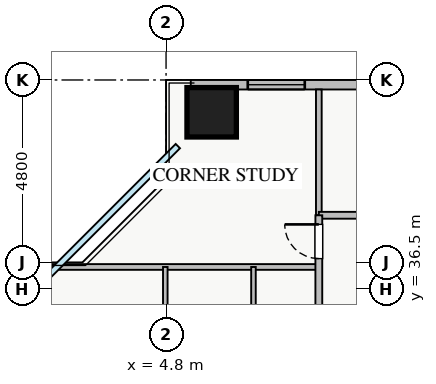
"""IFC4 building model, lengths in metres.
Left out: names, types, materials, properties, quantities, classifications, styles, units other than length and angle.
Written with IfcOpenShell. Run it as: python <this file> out.ifc"""

import sys

from ifc_helpers import new_model, si_unit, direction, frame, frame_2d, origin, origin_2d, place, context, subcontext, project, spatial, rectangle, extrude, source, transform, mapped, element, fill, save


model = new_model("IFC4")
c1 = context("Model", 3, precision=1e-05, world=origin(), true_north=direction((0.0, 1.0)))
c2 = subcontext(c1, "Body", "Model", "MODEL_VIEW")
j1 = project(units=[si_unit("LENGTHUNIT", "METRE"), si_unit("PLANEANGLEUNIT", "RADIAN")], contexts=[c1])
p1 = place(None, origin())
s1 = spatial("IfcSite", under=j1, at=p1, CompositionType="ELEMENT")
p2 = place(p1, origin())
s2 = spatial("IfcBuilding", under=s1, at=p2, CompositionType="ELEMENT")
p3 = place(p2, frame((0.0, 0.0, 56.75)))
s3 = spatial("IfcBuildingStorey", under=s2, at=p3, CompositionType="ELEMENT", Elevation=56.75)
m1 = source(origin(), c2, "Body", "SweptSolid", [
    extrude(rectangle(XDim=1.3, YDim=1.3, at=origin_2d()), origin(), (0.0, 0.0, 1.0), 3.25),
])
p4 = place(p3, frame((6.0, 41.15, 0.0), z_axis=(0.0, 0.0, 1.0), x_axis=(1.0, 0.0, 0.0)))
e1 = element("IfcColumn", 1, at=p4, inside=s3, PredefinedType="COLUMN", context=c2, shape_type="MappedRepresentation", body=[
    mapped(m1, transform((0.0, 0.0, 0.0), x_axis=(1.0, 0.0, 0.0), y_axis=(0.0, 1.0, 0.0), z_axis=(0.0, 0.0, 1.0), scale=1.0)),
])
p5 = place(p3, frame((5.45, 41.875, 0.0), z_axis=(0.0, 0.0, 1.0), x_axis=(1.0, 0.0, 0.0)))
e2 = element("IfcWall", 2, at=p5, inside=s3, PredefinedType="STANDARD", context=c2, shape_type="SweptSolid", body=[
    extrude(rectangle(XDim=27.1, YDim=0.25, at=frame_2d((13.55, 0.0))), origin(), (0.0, 0.0, 1.0), 2.61),
])
p6 = place(p5, frame((14.4, 0.0, 0.0)))
e3 = element("IfcOpeningElement", 3, at=p6, cuts=e2, PredefinedType="OPENING", context=c2, shape_type="SweptSolid", body=[
    extrude(rectangle(XDim=1.2, YDim=2.1, at=frame_2d((0.6, 1.05))), frame((0.0, 0.135, 0.0), z_axis=(0.0, -1.0, 0.0), x_axis=(1.0, 0.0, 0.0)), (0.0, 0.0, 1.0), 0.27),
])
p7 = place(p5, frame((1.5, 0.0, 0.9)))
e4 = element("IfcOpeningElement", 4, at=p7, cuts=e2, PredefinedType="OPENING", context=c2, shape_type="SweptSolid", body=[
    extrude(rectangle(XDim=1.5, YDim=1.5, at=frame_2d((0.75, 0.75))), frame((0.0, 0.135, 0.0), z_axis=(0.0, -1.0, 0.0), x_axis=(1.0, 0.0, 0.0)), (0.0, 0.0, 1.0), 0.27),
])
p8 = place(p5, frame((9.263, 0.0, 0.9)))
e5 = element("IfcOpeningElement", 5, at=p8, cuts=e2, PredefinedType="OPENING", context=c2, shape_type="SweptSolid", body=[
    extrude(rectangle(XDim=1.8, YDim=1.45, at=frame_2d((0.9, 0.725))), frame((0.0, 0.135, 0.0), z_axis=(0.0, -1.0, 0.0), x_axis=(1.0, 0.0, 0.0)), (0.0, 0.0, 1.0), 0.27),
])
p9 = place(p5, frame((18.774, 0.0, 0.9)))
e6 = element("IfcOpeningElement", 6, at=p9, cuts=e2, PredefinedType="OPENING", context=c2, shape_type="SweptSolid", body=[
    extrude(rectangle(XDim=1.5, YDim=1.5, at=frame_2d((0.75, 0.75))), frame((0.0, 0.135, 0.0), z_axis=(0.0, -1.0, 0.0), x_axis=(1.0, 0.0, 0.0)), (0.0, 0.0, 1.0), 0.27),
])
p10 = place(p5, frame((22.663, 0.0, 0.9)))
e7 = element("IfcOpeningElement", 7, at=p10, cuts=e2, PredefinedType="OPENING", context=c2, shape_type="SweptSolid", body=[
    extrude(rectangle(XDim=2.1, YDim=1.48, at=frame_2d((1.05, 0.74))), frame((0.0, 0.135, 0.0), z_axis=(0.0, -1.0, 0.0), x_axis=(1.0, 0.0, 0.0)), (0.0, 0.0, 1.0), 0.27),
])
p11 = place(p5, frame((5.134, 0.0, 0.9)))
e8 = element("IfcOpeningElement", 8, at=p11, cuts=e2, PredefinedType="OPENING", context=c2, shape_type="SweptSolid", body=[
    extrude(rectangle(XDim=2.4, YDim=1.5, at=frame_2d((1.2, 0.75))), frame((0.0, 0.135, 0.0), z_axis=(0.0, -1.0, 0.0), x_axis=(1.0, 0.0, 0.0)), (0.0, 0.0, 1.0), 0.27),
])
p12 = place(p3, frame((8.82, 38.44, 0.0), z_axis=(0.0, 0.0, 1.0), x_axis=(0.0, 1.0, 0.0)))
e9 = element("IfcWall", 9, at=p12, inside=s3, PredefinedType="PARTITIONING", context=c2, shape_type="SweptSolid", body=[
    extrude(rectangle(XDim=3.31, YDim=0.15, at=frame_2d((1.655, 0.0))), origin(), (0.0, 0.0, 1.0), 3.07),
])
p13 = place(p3, frame((8.82, 38.44, 0.0), z_axis=(0.0, 0.0, 1.0), x_axis=(1.0, 0.0, 0.0)))
e10 = element("IfcWall", 10, at=p13, inside=s3, PredefinedType="PARTITIONING", context=c2, shape_type="SweptSolid", body=[
    extrude(rectangle(XDim=23.58, YDim=0.18, at=frame_2d((11.79, 0.0))), origin(), (0.0, 0.0, 1.0), 3.07),
])
p14 = place(p13, frame((5.99, 0.0, 0.0)))
e11 = element("IfcOpeningElement", 11, at=p14, cuts=e10, PredefinedType="OPENING", context=c2, shape_type="SweptSolid", body=[
    extrude(rectangle(XDim=1.0, YDim=2.05, at=frame_2d((0.5, 1.025))), frame((0.0, 0.1, 0.0), z_axis=(0.0, -1.0, 0.0), x_axis=(1.0, 0.0, 0.0)), (0.0, 0.0, 1.0), 0.2),
])
p15 = place(p13, frame((17.78, 0.0, 0.0)))
e12 = element("IfcOpeningElement", 12, at=p15, cuts=e10, PredefinedType="OPENING", context=c2, shape_type="SweptSolid", body=[
    extrude(rectangle(XDim=1.0, YDim=2.05, at=frame_2d((0.5, 1.025))), frame((0.0, 0.1, 0.0), z_axis=(0.0, -1.0, 0.0), x_axis=(1.0, 0.0, 0.0)), (0.0, 0.0, 1.0), 0.2),
])
p16 = place(p3, frame((0.25, 37.08, 0.0), z_axis=(0.0, 0.0, 1.0), x_axis=(1.0, 0.0, 0.0)))
e13 = element("IfcWall", 13, at=p16, inside=s3, PredefinedType="PARTITIONING", context=c2, shape_type="SweptSolid", body=[
    extrude(rectangle(XDim=8.57, YDim=0.15, at=frame_2d((4.285, 0.0))), origin(), (0.0, 0.0, 1.0), 3.07),
])
for number, where, z_axis, x_axis in (
    (14, (4.78, 32.14, 0.0), (0.0, 0.0, 1.0), (0.0, 1.0, 0.0)),
    (15, (7.1, 32.14, 0.0), (0.0, 0.0, 1.0), (0.0, 1.0, 0.0)),
):
    element("IfcWall", number, at=place(p3, frame(where, z_axis=z_axis, x_axis=x_axis)), inside=s3, PredefinedType="PLUMBINGWALL", context=c2, shape_type="SweptSolid", body=[
        extrude(rectangle(XDim=4.94, YDim=0.12, at=frame_2d((2.47, 0.0))), origin(), (0.0, 0.0, 1.0), 3.07),
    ])
p17 = place(p3, frame((8.82, 7.21, 0.0), z_axis=(0.0, 0.0, 1.0), x_axis=(0.0, 1.0, 0.0)))
e16 = element("IfcWall", 16, at=p17, inside=s3, PredefinedType="PARTITIONING", context=c2, shape_type="SweptSolid", body=[
    extrude(rectangle(XDim=31.23, YDim=0.18, at=frame_2d((15.615, 0.0))), origin(), (0.0, 0.0, 1.0), 3.07),
])
p18 = place(p17, frame((30.09, 0.0, 0.0)))
e17 = element("IfcOpeningElement", 17, at=p18, cuts=e16, PredefinedType="OPENING", context=c2, shape_type="SweptSolid", body=[
    extrude(rectangle(XDim=0.9, YDim=2.05, at=frame_2d((0.45, 1.025))), frame((0.0, 0.1, 0.0), z_axis=(0.0, -1.0, 0.0), x_axis=(1.0, 0.0, 0.0)), (0.0, 0.0, 1.0), 0.2),
])
p19 = place(p17, frame((0.24, 0.0, 0.0)))
e18 = element("IfcOpeningElement", 18, at=p19, cuts=e16, PredefinedType="OPENING", context=c2, shape_type="SweptSolid", body=[
    extrude(rectangle(XDim=0.9, YDim=2.05, at=frame_2d((0.45, 1.025))), frame((0.0, 0.1, 0.0), z_axis=(0.0, -1.0, 0.0), x_axis=(1.0, 0.0, 0.0)), (0.0, 0.0, 1.0), 0.2),
])
p20 = place(p17, frame((2.95, 0.0, 0.0)))
e19 = element("IfcOpeningElement", 19, at=p20, cuts=e16, PredefinedType="OPENING", context=c2, shape_type="SweptSolid", body=[
    extrude(rectangle(XDim=1.0, YDim=2.05, at=frame_2d((0.5, 1.025))), frame((0.0, 0.1, 0.0), z_axis=(0.0, -1.0, 0.0), x_axis=(1.0, 0.0, 0.0)), (0.0, 0.0, 1.0), 0.2),
])
p21 = place(p17, frame((15.115, 0.0, 0.0)))
e20 = element("IfcOpeningElement", 20, at=p21, cuts=e16, PredefinedType="OPENING", context=c2, shape_type="SweptSolid", body=[
    extrude(rectangle(XDim=1.0, YDim=2.05, at=frame_2d((0.5, 1.025))), frame((0.0, 0.1, 0.0), z_axis=(0.0, -1.0, 0.0), x_axis=(1.0, 0.0, 0.0)), (0.0, 0.0, 1.0), 0.2),
])
p22 = place(p17, frame((21.96, 0.0, 0.0)))
e21 = element("IfcOpeningElement", 21, at=p22, cuts=e16, PredefinedType="OPENING", context=c2, shape_type="SweptSolid", body=[
    extrude(rectangle(XDim=1.0, YDim=2.05, at=frame_2d((0.5, 1.025))), frame((0.0, 0.1, 0.0), z_axis=(0.0, -1.0, 0.0), x_axis=(1.0, 0.0, 0.0)), (0.0, 0.0, 1.0), 0.2),
])
m2 = source(origin(), c2, "Body", "SweptSolid", [
    extrude(rectangle(XDim=1.5, YDim=1.5, at=frame_2d((0.75, 0.75))), frame((0.0, 0.03, 0.0), z_axis=(0.0, -1.0, 0.0), x_axis=(1.0, 0.0, 0.0)), (0.0, 0.0, 1.0), 0.06),
])
p23 = place(p7, origin())
e22 = element("IfcWindow", 22, at=p23, inside=s3, PartitioningType="TRIPLE_PANEL_VERTICAL", PredefinedType="WINDOW", context=c2, shape_type="MappedRepresentation", body=[
    mapped(m2, transform((0.0, 0.0, 0.0), x_axis=(1.0, 0.0, 0.0), y_axis=(0.0, 1.0, 0.0), z_axis=(0.0, 0.0, 1.0), scale=1.0)),
])
fill(e4, e22)
m3 = source(origin(), c2, "Body", "SweptSolid", [
    extrude(rectangle(XDim=0.9, YDim=2.05, at=frame_2d((0.45, 1.025))), frame((0.0, 0.025, 0.0), z_axis=(0.0, -1.0, 0.0), x_axis=(1.0, 0.0, 0.0)), (0.0, 0.0, 1.0), 0.05),
])
p24 = place(p18, origin())
e23 = element("IfcDoor", 23, at=p24, inside=s3, OperationType="SINGLE_SWING_RIGHT", PredefinedType="DOOR", context=c2, shape_type="MappedRepresentation", body=[
    mapped(m3, transform((0.0, 0.0, 0.0), x_axis=(1.0, 0.0, 0.0), y_axis=(0.0, 1.0, 0.0), z_axis=(0.0, 0.0, 1.0), scale=1.0)),
])
fill(e17, e23)
save(model, sys.argv[1])
